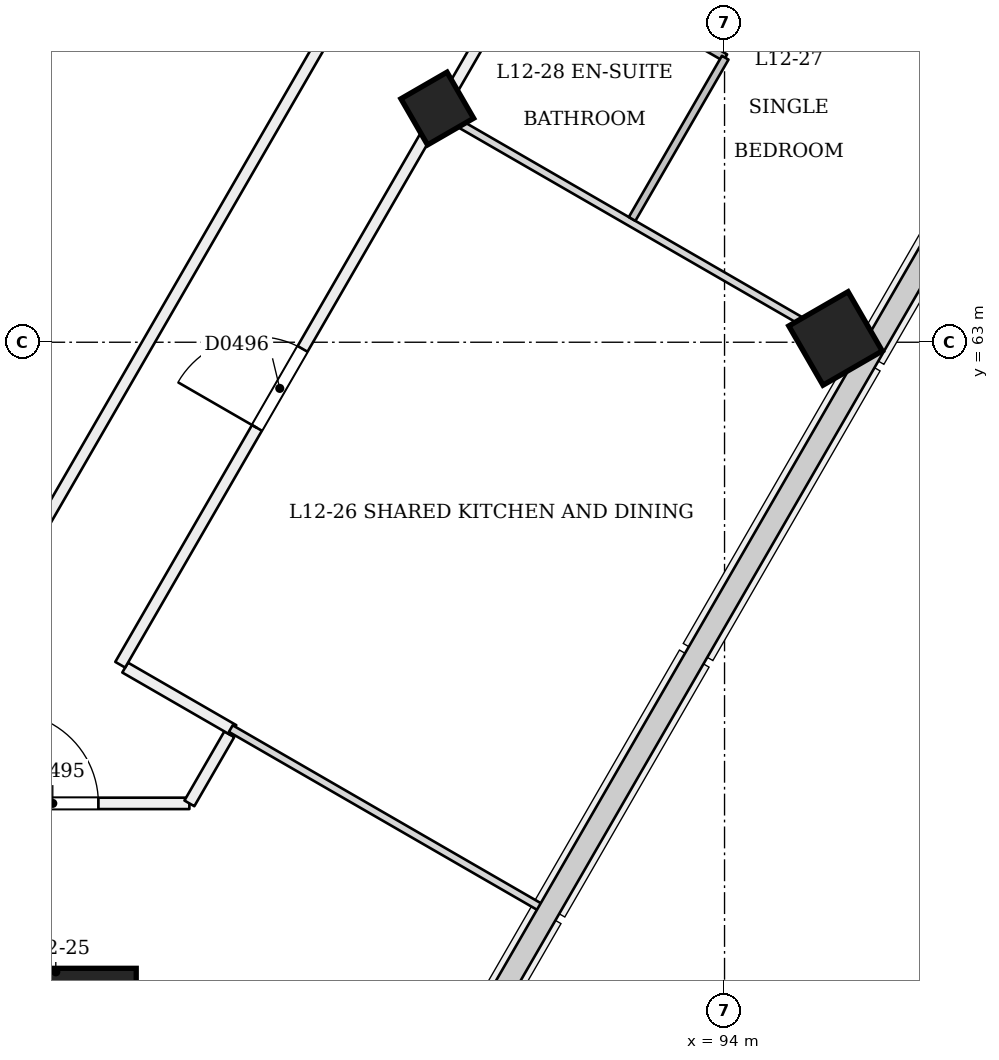
"""IFC4 building model, lengths in metres.
Left out: names, types, materials, properties, quantities, classifications, styles, units other than length and angle.
Written with IfcOpenShell. Run it as: python <this file> out.ifc"""

import sys

from ifc_helpers import new_model, si_unit, direction, frame, frame_2d, origin, origin_2d, place, context, subcontext, project, spatial, rectangle, extrude, element, fill, save


model = new_model("IFC4")
c1 = context("Model", 3, precision=1e-05, world=origin(), true_north=direction((0.0, 1.0)))
c2 = subcontext(c1, "Body", "Model", "MODEL_VIEW")
j1 = project(units=[si_unit("LENGTHUNIT", "METRE"), si_unit("PLANEANGLEUNIT", "RADIAN")], contexts=[c1])
p1 = place(None, origin())
s1 = spatial("IfcSite", under=j1, at=p1, CompositionType="ELEMENT")
p2 = place(p1, origin())
s2 = spatial("IfcBuilding", under=s1, at=p2, CompositionType="ELEMENT")
p3 = place(p2, frame((0.0, 0.0, 52.2)))
s3 = spatial("IfcBuildingStorey", under=s2, at=p3, CompositionType="ELEMENT", Elevation=52.2)
p4 = place(p3, frame((90.248, 66.028, -0.021), z_axis=(-0.022153634206, 0.038480930364, 0.999013730882), x_axis=(-0.501310197162, -0.864982765299, 0.022201395376)))
e1 = element("IfcColumn", 1, at=p4, inside=s3, PredefinedType="COLUMN", context=c2, shape_type="SweptSolid", body=[
    extrude(rectangle(XDim=0.7, YDim=0.7, at=origin_2d()), origin(), (0.0, 0.0, 1.0), 3.604),
])
p5 = place(p3, frame((85.0, 53.433, 0.0), z_axis=(0.0, 0.058356907999, 0.998295783467), x_axis=(-1.0, 0.0, 0.0)))
e2 = element("IfcColumn", 2, at=p5, inside=s3, PredefinedType="COLUMN", context=c2, shape_type="SweptSolid", body=[
    extrude(rectangle(XDim=2.52, YDim=2.52, at=origin_2d()), origin(), (0.0, 0.0, 1.0), 3.606),
])
p6 = place(p3, frame((95.488, 63.002, -0.027), z_axis=(-0.022221406801, 0.038413224561, 0.999014831351), x_axis=(-0.499505579872, -0.866026456538, 0.02218901198)))
e3 = element("IfcColumn", 3, at=p6, inside=s3, PredefinedType="COLUMN", context=c2, shape_type="SweptSolid", body=[
    extrude(rectangle(XDim=0.9, YDim=0.9, at=origin_2d()), origin(), (0.0, 0.0, 1.0), 3.604),
])
p7 = place(p3, frame((84.191, 56.933, 0.0), z_axis=(0.0, 0.0, 1.0), x_axis=(1.0, 0.0, 0.0)))
e4 = element("IfcWall", 4, at=p7, inside=s3, PredefinedType="PARTITIONING", context=c2, shape_type="SweptSolid", body=[
    extrude(rectangle(XDim=2.768, YDim=0.15, at=frame_2d((1.384, 0.0))), origin(), (0.0, 0.0, 1.0), 3.1),
])
p8 = place(p7, frame((0.371, 0.0, 0.0)))
e5 = element("IfcOpeningElement", 5, at=p8, cuts=e4, PredefinedType="OPENING", context=c2, shape_type="SweptSolid", body=[
    extrude(rectangle(XDim=1.2, YDim=2.1, at=frame_2d((0.6, 1.05))), frame((0.0, 0.085, 0.0), z_axis=(0.0, -1.0, 0.0), x_axis=(1.0, 0.0, 0.0)), (0.0, 0.0, 1.0), 0.171),
])
p9 = place(p3, frame((86.959, 56.933, 0.0), z_axis=(0.0, 0.0, 1.0), x_axis=(0.500091574638, 0.865972526687, 0.0)))
e6 = element("IfcWall", 6, at=p9, inside=s3, PredefinedType="PARTITIONING", context=c2, shape_type="SweptSolid", body=[
    extrude(rectangle(XDim=1.05, YDim=0.15, at=frame_2d((0.525, 0.0))), origin(), (0.0, 0.0, 1.0), 3.1),
])
p10 = place(p3, frame((87.539, 57.897, 0.0), z_axis=(0.0, 0.0, 1.0), x_axis=(-0.866015045157, 0.50001794124, 0.0)))
e7 = element("IfcWall", 7, at=p10, inside=s3, PredefinedType="PARTITIONING", context=c2, shape_type="SweptSolid", body=[
    extrude(rectangle(XDim=1.645, YDim=0.15, at=frame_2d((0.823, 0.0))), origin(), (0.0, 0.0, 1.0), 3.1),
])
p11 = place(p3, frame((86.05, 58.757, 0.0), z_axis=(0.0, 0.0, 1.0), x_axis=(0.499999296855, 0.866025809745, 0.0)))
e8 = element("IfcWall", 8, at=p11, inside=s3, PredefinedType="PARTITIONING", context=c2, shape_type="SweptSolid", body=[
    extrude(rectangle(XDim=43.792, YDim=0.15, at=frame_2d((21.896, 0.0))), origin(), (0.0, 0.0, 1.0), 2.7),
])
p12 = place(p11, frame((3.598, 0.0, 0.0)))
e9 = element("IfcOpeningElement", 9, at=p12, cuts=e8, PredefinedType="OPENING", context=c2, shape_type="SweptSolid", body=[
    extrude(rectangle(XDim=1.2, YDim=2.1, at=frame_2d((0.6, 1.05))), frame((0.0, 0.085, 0.0), z_axis=(0.0, -1.0, 0.0), x_axis=(1.0, 0.0, 0.0)), (0.0, 0.0, 1.0), 0.171),
])
p13 = place(p11, frame((11.176, 0.0, 0.0)))
e10 = element("IfcOpeningElement", 10, at=p13, cuts=e8, PredefinedType="OPENING", context=c2, shape_type="SweptSolid", body=[
    extrude(rectangle(XDim=1.0, YDim=2.1, at=frame_2d((0.5, 1.05))), frame((0.0, 0.085, 0.0), z_axis=(0.0, -1.0, 0.0), x_axis=(1.0, 0.0, 0.0)), (0.0, 0.0, 1.0), 0.171),
])
p14 = place(p11, frame((13.616, 0.0, 0.0)))
e11 = element("IfcOpeningElement", 11, at=p14, cuts=e8, PredefinedType="OPENING", context=c2, shape_type="SweptSolid", body=[
    extrude(rectangle(XDim=1.0, YDim=2.1, at=frame_2d((0.5, 1.05))), frame((0.0, 0.085, 0.0), z_axis=(0.0, -1.0, 0.0), x_axis=(1.0, 0.0, 0.0)), (0.0, 0.0, 1.0), 0.171),
])
p15 = place(p11, frame((20.176, 0.0, 0.0)))
e12 = element("IfcOpeningElement", 12, at=p15, cuts=e8, PredefinedType="OPENING", context=c2, shape_type="SweptSolid", body=[
    extrude(rectangle(XDim=1.0, YDim=2.1, at=frame_2d((0.5, 1.05))), frame((0.0, 0.085, 0.0), z_axis=(0.0, -1.0, 0.0), x_axis=(1.0, 0.0, 0.0)), (0.0, 0.0, 1.0), 0.171),
])
p16 = place(p11, frame((22.616, 0.0, 0.0)))
e13 = element("IfcOpeningElement", 13, at=p16, cuts=e8, PredefinedType="OPENING", context=c2, shape_type="SweptSolid", body=[
    extrude(rectangle(XDim=1.0, YDim=2.1, at=frame_2d((0.5, 1.05))), frame((0.0, 0.085, 0.0), z_axis=(0.0, -1.0, 0.0), x_axis=(1.0, 0.0, 0.0)), (0.0, 0.0, 1.0), 0.171),
])
p17 = place(p11, frame((29.176, 0.0, 0.0)))
e14 = element("IfcOpeningElement", 14, at=p17, cuts=e8, PredefinedType="OPENING", context=c2, shape_type="SweptSolid", body=[
    extrude(rectangle(XDim=1.0, YDim=2.1, at=frame_2d((0.5, 1.05))), frame((0.0, 0.085, 0.0), z_axis=(0.0, -1.0, 0.0), x_axis=(1.0, 0.0, 0.0)), (0.0, 0.0, 1.0), 0.171),
])
p18 = place(p11, frame((31.616, 0.0, 0.0)))
e15 = element("IfcOpeningElement", 15, at=p18, cuts=e8, PredefinedType="OPENING", context=c2, shape_type="SweptSolid", body=[
    extrude(rectangle(XDim=1.0, YDim=2.1, at=frame_2d((0.5, 1.05))), frame((0.0, 0.085, 0.0), z_axis=(0.0, -1.0, 0.0), x_axis=(1.0, 0.0, 0.0)), (0.0, 0.0, 1.0), 0.171),
])
p19 = place(p11, frame((38.176, 0.0, 0.0)))
e16 = element("IfcOpeningElement", 16, at=p19, cuts=e8, PredefinedType="OPENING", context=c2, shape_type="SweptSolid", body=[
    extrude(rectangle(XDim=1.0, YDim=2.1, at=frame_2d((0.5, 1.05))), frame((0.0, 0.085, 0.0), z_axis=(0.0, -1.0, 0.0), x_axis=(1.0, 0.0, 0.0)), (0.0, 0.0, 1.0), 0.171),
])
p20 = place(p11, frame((41.344, 0.0, 0.0)))
e17 = element("IfcOpeningElement", 17, at=p20, cuts=e8, PredefinedType="OPENING", context=c2, shape_type="SweptSolid", body=[
    extrude(rectangle(XDim=1.0, YDim=2.1, at=frame_2d((0.5, 1.05))), frame((0.0, 0.085, 0.0), z_axis=(0.0, -1.0, 0.0), x_axis=(1.0, 0.0, 0.0)), (0.0, 0.0, 1.0), 0.171),
])
p21 = place(p3, frame((102.355, 90.6, 0.0), z_axis=(0.0, 0.0, 1.0), x_axis=(-0.500000924128, -0.866024870238, 0.0)))
e18 = element("IfcWall", 18, at=p21, inside=s3, PredefinedType="PARTITIONING", context=c2, shape_type="SweptSolid", body=[
    extrude(rectangle(XDim=34.581, YDim=0.15, at=frame_2d((17.291, 0.0))), origin(), (0.0, 0.0, 1.0), 3.1),
])
p22 = place(p21, frame((9.118, 0.0, 0.0)))
e19 = element("IfcOpeningElement", 19, at=p22, cuts=e18, PredefinedType="OPENING", context=c2, shape_type="SweptSolid", body=[
    extrude(rectangle(XDim=1.2, YDim=2.1, at=frame_2d((0.6, 1.05))), frame((0.0, 0.085, 0.0), z_axis=(0.0, -1.0, 0.0), x_axis=(1.0, 0.0, 0.0)), (0.0, 0.0, 1.0), 0.171),
])
p23 = place(p3, frame((91.61, 55.547, 0.0), z_axis=(0.0, 0.0, 1.0), x_axis=(-0.866028632512, 0.499994407638, 0.0)))
e20 = element("IfcWall", 20, at=p23, inside=s3, PredefinedType="PARTITIONING", context=c2, shape_type="SweptSolid", body=[
    extrude(rectangle(XDim=4.74, YDim=0.1, at=frame_2d((2.37, 0.0))), origin(), (0.0, 0.0, 1.0), 2.6),
])
p24 = place(p3, frame((95.79, 62.828, 0.0), z_axis=(0.0, 0.0, 1.0), x_axis=(-0.866015887322, 0.500016482634, 0.0)))
e21 = element("IfcWall", 21, at=p24, inside=s3, PredefinedType="PARTITIONING", context=c2, shape_type="SweptSolid", body=[
    extrude(rectangle(XDim=6.325, YDim=0.1, at=frame_2d((3.163, 0.0))), origin(), (0.0, 0.0, 1.0), 2.6),
])
p25 = place(p3, frame((91.562, 68.156, 0.0), z_axis=(0.0, 0.0, 1.0), x_axis=(0.866048868473, -0.499959355765, 0.0)))
e22 = element("IfcWall", 22, at=p25, inside=s3, PredefinedType="PARTITIONING", context=c2, shape_type="SweptSolid", body=[
    extrude(rectangle(XDim=2.825, YDim=0.1, at=frame_2d((1.413, 0.0))), origin(), (0.0, 0.0, 1.0), 3.1),
])
p26 = place(p25, frame((0.925, 0.0, 0.0)))
e23 = element("IfcOpeningElement", 23, at=p26, cuts=e22, PredefinedType="OPENING", context=c2, shape_type="SweptSolid", body=[
    extrude(rectangle(XDim=0.9, YDim=2.1, at=frame_2d((0.45, 1.05))), frame((0.0, 0.061, 0.0), z_axis=(0.0, -1.0, 0.0), x_axis=(1.0, 0.0, 0.0)), (0.0, 0.0, 1.0), 0.121),
])
p27 = place(p3, frame((94.009, 66.744, 0.0), z_axis=(0.0, 0.0, 1.0), x_axis=(-0.500018594424, -0.866014668023, 0.0)))
e24 = element("IfcWall", 24, at=p27, inside=s3, PredefinedType="PARTITIONING", context=c2, shape_type="SweptSolid", body=[
    extrude(rectangle(XDim=2.45, YDim=0.1, at=frame_2d((1.225, 0.0))), origin(), (0.0, 0.0, 1.0), 2.7),
])
p28 = place(p3, frame((98.058, 66.716, 0.0), z_axis=(0.0, 0.0, 1.0), x_axis=(-0.866025401434, 0.500000004071, 0.0)))
e25 = element("IfcWall", 25, at=p28, inside=s3, PredefinedType="PARTITIONING", context=c2, shape_type="SweptSolid", body=[
    extrude(rectangle(XDim=6.345, YDim=0.15, at=frame_2d((3.173, 0.0))), origin(), (0.0, 0.0, 1.0), 2.6),
])
p29 = place(p8, origin())
e26 = element("IfcDoor", 26, at=p29, inside=s3, OperationType="SINGLE_SWING_LEFT", PredefinedType="NOTDEFINED", context=c2, shape_type="SweptSolid", body=[
    extrude(rectangle(XDim=1.2, YDim=2.1, at=frame_2d((0.6, 1.05))), frame((0.0, 0.025, 0.0), z_axis=(0.0, -1.0, 0.0), x_axis=(1.0, 0.0, 0.0)), (0.0, 0.0, 1.0), 0.05),
])
fill(e5, e26)
p30 = place(p12, origin())
e27 = element("IfcDoor", 27, at=p30, inside=s3, OperationType="SINGLE_SWING_LEFT", PredefinedType="NOTDEFINED", context=c2, shape_type="SweptSolid", body=[
    extrude(rectangle(XDim=1.2, YDim=2.1, at=frame_2d((0.6, 1.05))), frame((0.0, 0.025, 0.0), z_axis=(0.0, -1.0, 0.0), x_axis=(1.0, 0.0, 0.0)), (0.0, 0.0, 1.0), 0.05),
])
fill(e9, e27)
save(model, sys.argv[1])
